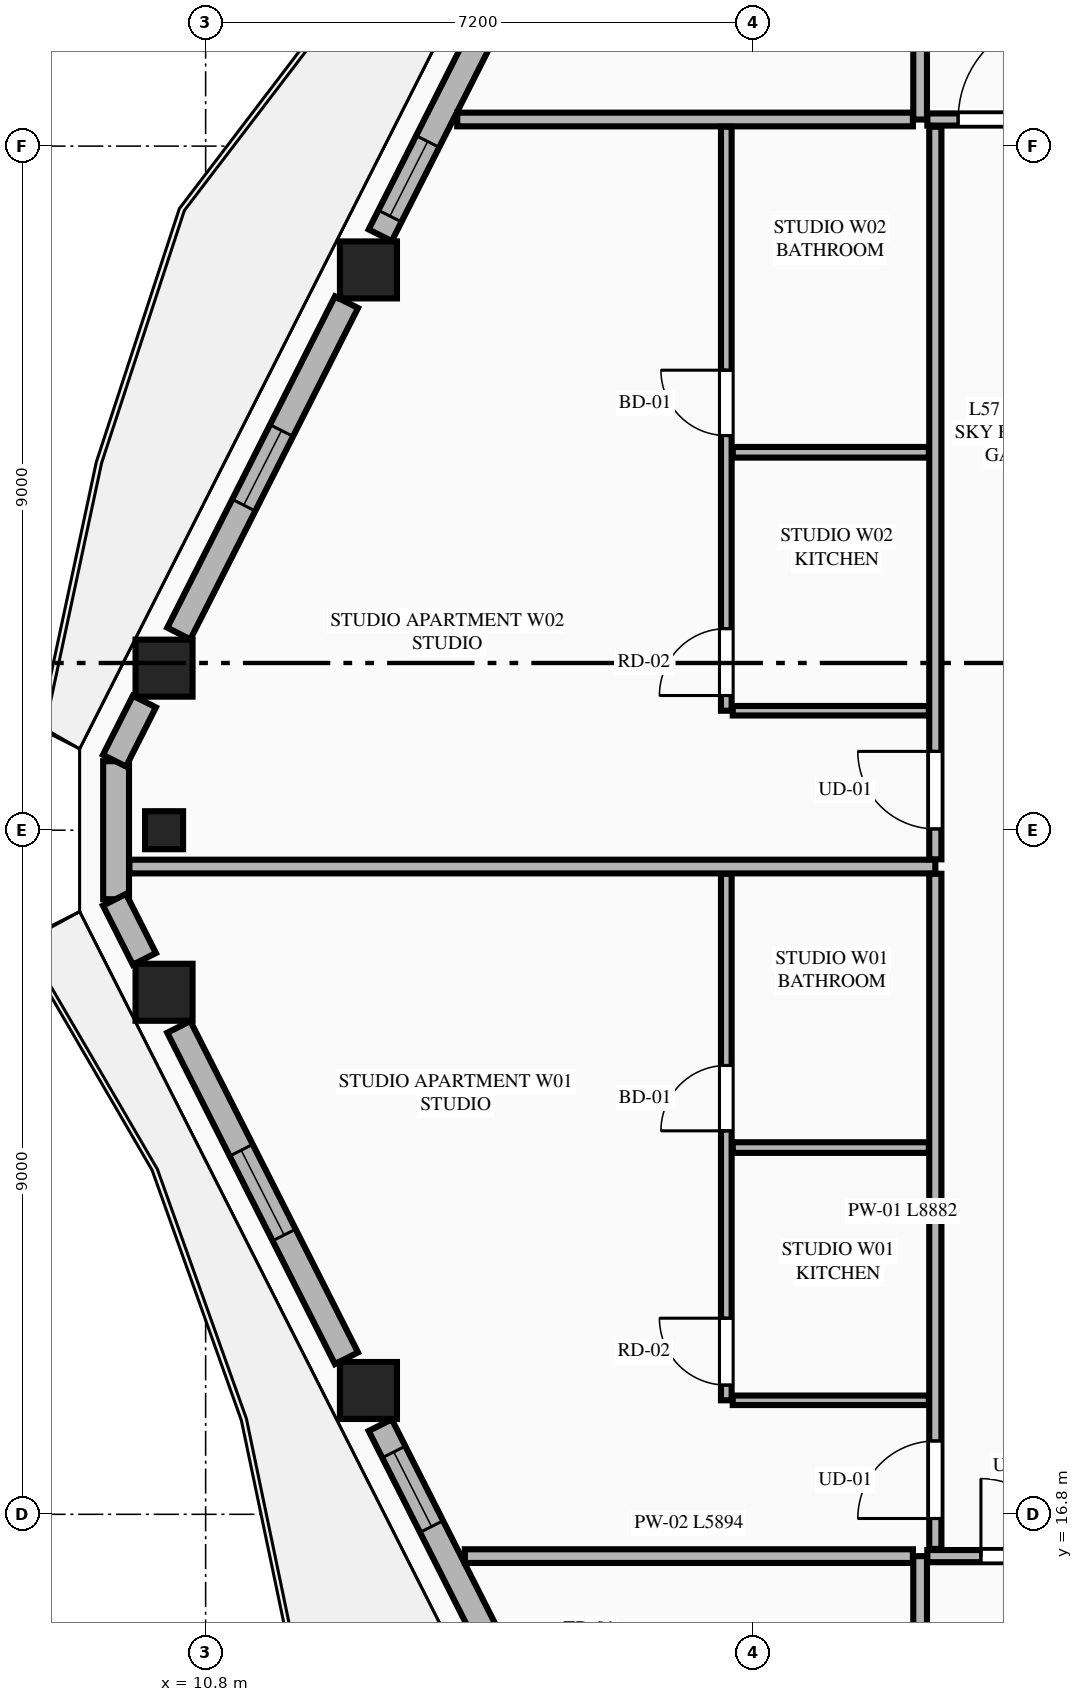
"""IFC4 building model, lengths in metres.
Left out: names, types, materials, properties, quantities, classifications, styles, units other than length and angle.
Written with IfcOpenShell. Run it as: python <this file> out.ifc"""

import sys

from ifc_helpers import new_model, si_unit, direction, frame, frame_2d, origin, origin_2d, place, context, subcontext, project, spatial, rectangle, extrude, element, fill, save


model = new_model("IFC4")
c1 = context("Model", 3, precision=1e-05, world=origin(), true_north=direction((0.0, 1.0)))
c2 = subcontext(c1, "Body", "Model", "MODEL_VIEW")
j1 = project(units=[si_unit("LENGTHUNIT", "METRE"), si_unit("PLANEANGLEUNIT", "RADIAN")], contexts=[c1])
p1 = place(None, origin())
s1 = spatial("IfcSite", under=j1, at=p1, CompositionType="ELEMENT")
p2 = place(p1, origin())
s2 = spatial("IfcBuilding", under=s1, at=p2, CompositionType="ELEMENT")
p3 = place(p2, frame((0.0, 0.0, 214.5)))
s3 = spatial("IfcBuildingStorey", under=s2, at=p3, CompositionType="ELEMENT", Elevation=214.5)
for number, where, z_axis, x_axis in (
    (1, (12.942, 33.171, 0.0), (0.0, 0.0, 1.0), (1.0, 0.0, 0.0)),
    (2, (10.253, 27.932, 0.0), (0.0, 0.0, 1.0), (1.0, 0.0, 0.0)),
    (3, (10.253, 23.668, 0.0), (0.0, 0.0, 1.0), (1.0, 0.0, 0.0)),
    (4, (12.942, 18.429, 0.0), (0.0, 0.0, 1.0), (1.0, 0.0, 0.0)),
):
    element("IfcColumn", number, at=place(p3, frame(where, z_axis=z_axis, x_axis=x_axis)), inside=s3, PredefinedType="COLUMN", context=c2, shape_type="SweptSolid", body=[
        extrude(rectangle(XDim=0.75, YDim=0.75, at=origin_2d()), origin(), (0.0, 0.0, 1.0), 3.55),
    ])
p4 = place(p3, frame((10.253, 25.8, 0.0), z_axis=(0.0, 0.0, 1.0), x_axis=(0.0, -1.0, 0.0)))
e5 = element("IfcColumn", 5, at=p4, inside=s3, PredefinedType="PILASTER", context=c2, shape_type="SweptSolid", body=[
    extrude(rectangle(XDim=0.5, YDim=0.35, at=origin_2d()), origin(), (0.0, 0.0, 1.0), 3.55),
])
p5 = place(p3, frame((9.622, 26.708, 0.0), z_axis=(0.0, 0.0, 1.0), x_axis=(0.0, -1.0, 0.0)))
e6 = element("IfcWall", 6, at=p5, inside=s3, PredefinedType="STANDARD", context=c2, shape_type="SweptSolid", body=[
    extrude(rectangle(XDim=1.816, YDim=0.34, at=frame_2d((0.908, 0.0))), origin(), (0.0, 0.0, 1.0), 3.35),
])
p6 = place(p3, frame((15.397, 38.173, 0.0), z_axis=(0.0, 0.0, 1.0), x_axis=(-0.451444616922, -0.892299141461, 0.0)))
e7 = element("IfcWall", 7, at=p6, inside=s3, PredefinedType="STANDARD", context=c2, shape_type="SweptSolid", body=[
    extrude(rectangle(XDim=5.095, YDim=0.34, at=frame_2d((2.547, 0.0))), origin(), (0.0, 0.0, 1.0), 2.883),
])
p7 = place(p6, frame((1.019, 0.0, 0.0)))
e8 = element("IfcOpeningElement", 8, at=p7, cuts=e7, PredefinedType="OPENING", context=c2, shape_type="SweptSolid", body=[
    extrude(rectangle(XDim=1.1, YDim=2.25, at=frame_2d((0.55, 1.125))), frame((0.0, 0.18, 0.0), z_axis=(0.0, -1.0, 0.0), x_axis=(1.0, 0.0, 0.0)), (0.0, 0.0, 1.0), 0.36),
])
p8 = place(p6, frame((3.712, 0.0, 0.75)))
e9 = element("IfcOpeningElement", 9, at=p8, cuts=e7, PredefinedType="OPENING", context=c2, shape_type="SweptSolid", body=[
    extrude(rectangle(XDim=1.1, YDim=1.983, at=frame_2d((0.55, 0.991))), frame((0.0, 0.18, 0.0), z_axis=(0.0, -1.0, 0.0), x_axis=(1.0, 0.0, 0.0)), (0.0, 0.0, 1.0), 0.36),
])
p9 = place(p3, frame((12.653, 32.747, 0.0), z_axis=(0.0, 0.0, 1.0), x_axis=(-0.451545895749, -0.892247893824, 0.0)))
e10 = element("IfcWall", 10, at=p9, inside=s3, PredefinedType="STANDARD", context=c2, shape_type="SweptSolid", body=[
    extrude(rectangle(XDim=4.885, YDim=0.34, at=frame_2d((2.443, 0.0))), origin(), (0.0, 0.0, 1.0), 2.883),
])
p10 = place(p9, frame((1.893, 0.0, 0.75)))
e11 = element("IfcOpeningElement", 11, at=p10, cuts=e10, PredefinedType="OPENING", context=c2, shape_type="SweptSolid", body=[
    extrude(rectangle(XDim=1.1, YDim=1.983, at=frame_2d((0.55, 0.991))), frame((0.0, 0.18, 0.0), z_axis=(0.0, -1.0, 0.0), x_axis=(1.0, 0.0, 0.0)), (0.0, 0.0, 1.0), 0.36),
])
p11 = place(p3, frame((9.994, 27.493, 0.0), z_axis=(0.0, 0.0, 1.0), x_axis=(-0.450796198004, -0.892626902947, 0.0)))
e12 = element("IfcWall", 12, at=p11, inside=s3, PredefinedType="STANDARD", context=c2, shape_type="SweptSolid", body=[
    extrude(rectangle(XDim=0.871, YDim=0.34, at=frame_2d((0.436, 0.0))), origin(), (0.0, 0.0, 1.0), 3.35),
])
p12 = place(p3, frame((9.601, 24.885, 0.0), z_axis=(0.0, 0.0, 1.0), x_axis=(0.450683483537, -0.892683817299, 0.0)))
e13 = element("IfcWall", 13, at=p12, inside=s3, PredefinedType="STANDARD", context=c2, shape_type="SweptSolid", body=[
    extrude(rectangle(XDim=0.872, YDim=0.34, at=frame_2d((0.436, 0.0))), origin(), (0.0, 0.0, 1.0), 3.35),
])
p13 = place(p3, frame((10.447, 23.212, 0.0), z_axis=(0.0, 0.0, 1.0), x_axis=(0.451566029745, -0.892237704191, 0.0)))
e14 = element("IfcWall", 14, at=p13, inside=s3, PredefinedType="STANDARD", context=c2, shape_type="SweptSolid", body=[
    extrude(rectangle(XDim=4.885, YDim=0.34, at=frame_2d((2.443, 0.0))), origin(), (0.0, 0.0, 1.0), 2.883),
])
p14 = place(p13, frame((1.818, 0.0, 0.75)))
e15 = element("IfcOpeningElement", 15, at=p14, cuts=e14, PredefinedType="OPENING", context=c2, shape_type="SweptSolid", body=[
    extrude(rectangle(XDim=1.25, YDim=1.95, at=frame_2d((0.625, 0.975))), frame((0.0, 0.18, 0.0), z_axis=(0.0, -1.0, 0.0), x_axis=(1.0, 0.0, 0.0)), (0.0, 0.0, 1.0), 0.36),
])
p15 = place(p3, frame((13.097, 17.973, 0.0), z_axis=(0.0, 0.0, 1.0), x_axis=(0.451463920536, -0.892289374841, 0.0)))
e16 = element("IfcWall", 16, at=p15, inside=s3, PredefinedType="STANDARD", context=c2, shape_type="SweptSolid", body=[
    extrude(rectangle(XDim=5.095, YDim=0.34, at=frame_2d((2.547, 0.0))), origin(), (0.0, 0.0, 1.0), 2.883),
])
p16 = place(p15, frame((3.088, 0.0, 0.0)))
e17 = element("IfcOpeningElement", 17, at=p16, cuts=e16, PredefinedType="OPENING", context=c2, shape_type="SweptSolid", body=[
    extrude(rectangle(XDim=1.1, YDim=2.25, at=frame_2d((0.55, 1.125))), frame((0.0, 0.18, 0.0), z_axis=(0.0, -1.0, 0.0), x_axis=(1.0, 0.0, 0.0)), (0.0, 0.0, 1.0), 0.36),
])
p17 = place(p15, frame((0.395, 0.0, 0.75)))
e18 = element("IfcOpeningElement", 18, at=p17, cuts=e16, PredefinedType="OPENING", context=c2, shape_type="SweptSolid", body=[
    extrude(rectangle(XDim=1.1, YDim=1.983, at=frame_2d((0.55, 0.991))), frame((0.0, 0.18, 0.0), z_axis=(0.0, -1.0, 0.0), x_axis=(1.0, 0.0, 0.0)), (0.0, 0.0, 1.0), 0.36),
])
p18 = place(p3, frame((20.2, 5.968, 0.0), z_axis=(0.0, 0.0, 1.0), x_axis=(0.0, 1.0, 0.0)))
e19 = element("IfcWall", 19, at=p18, inside=s3, PredefinedType="PARTITIONING", context=c2, shape_type="SweptSolid", body=[
    extrude(rectangle(XDim=10.282, YDim=0.18, at=frame_2d((5.141, 0.0))), origin(), (0.0, 0.0, 1.0), 3.35),
])
p19 = place(p3, frame((20.295, 16.25, 0.0), z_axis=(0.0, 0.0, 1.0), x_axis=(1.0, 0.0, 0.0)))
e20 = element("IfcWall", 20, at=p19, inside=s3, PredefinedType="PARTITIONING", context=c2, shape_type="SweptSolid", body=[
    extrude(rectangle(XDim=24.21, YDim=0.16, at=frame_2d((12.105, 0.0))), origin(), (0.0, 0.0, 1.0), 3.35),
])
p20 = place(p19, frame((0.705, 0.0, 0.0)))
e21 = element("IfcOpeningElement", 21, at=p20, cuts=e20, PredefinedType="OPENING", context=c2, shape_type="SweptSolid", body=[
    extrude(rectangle(XDim=1.02, YDim=2.25, at=frame_2d((0.51, 1.125))), frame((0.0, 0.09, 0.0), z_axis=(0.0, -1.0, 0.0), x_axis=(1.0, 0.0, 0.0)), (0.0, 0.0, 1.0), 0.18),
])
p21 = place(p3, frame((20.2, 35.15, 0.0), z_axis=(0.0, 0.0, 1.0), x_axis=(0.0, 1.0, 0.0)))
e22 = element("IfcWall", 22, at=p21, inside=s3, PredefinedType="PARTITIONING", context=c2, shape_type="SweptSolid", body=[
    extrude(rectangle(XDim=10.482, YDim=0.18, at=frame_2d((5.241, 0.0))), origin(), (0.0, 0.0, 1.0), 3.35),
])
p22 = place(p3, frame((20.295, 35.15, 0.0), z_axis=(0.0, 0.0, 1.0), x_axis=(1.0, 0.0, 0.0)))
e23 = element("IfcWall", 23, at=p22, inside=s3, PredefinedType="PARTITIONING", context=c2, shape_type="SweptSolid", body=[
    extrude(rectangle(XDim=24.21, YDim=0.16, at=frame_2d((12.105, 0.0))), origin(), (0.0, 0.0, 1.0), 3.35),
])
p23 = place(p22, frame((0.405, 0.0, 0.0)))
e24 = element("IfcOpeningElement", 24, at=p23, cuts=e23, PredefinedType="OPENING", context=c2, shape_type="SweptSolid", body=[
    extrude(rectangle(XDim=1.35, YDim=2.35, at=frame_2d((0.675, 1.175))), frame((0.0, 0.09, 0.0), z_axis=(0.0, -1.0, 0.0), x_axis=(1.0, 0.0, 0.0)), (0.0, 0.0, 1.0), 0.18),
])
p24 = place(p3, frame((14.211, 16.25, 0.0), z_axis=(0.0, 0.0, 1.0), x_axis=(1.0, 0.0, 0.0)))
e25 = element("IfcWall", 25, at=p24, inside=s3, PredefinedType="PARTITIONING", context=c2, shape_type="SweptSolid", body=[
    extrude(rectangle(XDim=5.894, YDim=0.18, at=frame_2d((2.947, 0.0))), origin(), (0.0, 0.0, 1.0), 3.35),
])
p25 = place(p3, frame((14.11, 35.15, 0.0), z_axis=(0.0, 0.0, 1.0), x_axis=(1.0, 0.0, 0.0)))
e26 = element("IfcWall", 26, at=p25, inside=s3, PredefinedType="PARTITIONING", context=c2, shape_type="SweptSolid", body=[
    extrude(rectangle(XDim=5.995, YDim=0.18, at=frame_2d((2.998, 0.0))), origin(), (0.0, 0.0, 1.0), 3.35),
])
p26 = place(p3, frame((20.4, 16.345, 0.0), z_axis=(0.0, 0.0, 1.0), x_axis=(0.0, 1.0, 0.0)))
e27 = element("IfcWall", 27, at=p26, inside=s3, PredefinedType="PARTITIONING", context=c2, shape_type="SweptSolid", body=[
    extrude(rectangle(XDim=8.882, YDim=0.16, at=frame_2d((4.441, 0.0))), origin(), (0.0, 0.0, 1.0), 3.35),
])
p27 = place(p26, frame((0.4, 0.0, 0.0)))
e28 = element("IfcOpeningElement", 28, at=p27, cuts=e27, PredefinedType="OPENING", context=c2, shape_type="SweptSolid", body=[
    extrude(rectangle(XDim=1.02, YDim=2.25, at=frame_2d((0.51, 1.125))), frame((0.0, 0.09, 0.0), z_axis=(0.0, -1.0, 0.0), x_axis=(1.0, 0.0, 0.0)), (0.0, 0.0, 1.0), 0.18),
])
p28 = place(p3, frame((17.735, 18.3, 0.0), z_axis=(0.0, 0.0, 1.0), x_axis=(1.0, 0.0, 0.0)))
e29 = element("IfcWall", 29, at=p28, inside=s3, PredefinedType="PARTITIONING", context=c2, shape_type="SweptSolid", body=[
    extrude(rectangle(XDim=2.58, YDim=0.125, at=frame_2d((1.29, 0.0))), origin(), (0.0, 0.0, 1.0), 2.807),
])
p29 = place(p3, frame((17.65, 18.3, 0.0), z_axis=(0.0, 0.0, 1.0), x_axis=(0.0, 1.0, 0.0)))
e30 = element("IfcWall", 30, at=p29, inside=s3, PredefinedType="PLUMBINGWALL", context=c2, shape_type="SweptSolid", body=[
    extrude(rectangle(XDim=6.927, YDim=0.14, at=frame_2d((3.463, 0.0))), origin(), (0.0, 0.0, 1.0), 3.35),
])
p30 = place(p29, frame((3.545, 0.0, 0.0)))
e31 = element("IfcOpeningElement", 31, at=p30, cuts=e30, PredefinedType="OPENING", context=c2, shape_type="SweptSolid", body=[
    extrude(rectangle(XDim=0.86, YDim=2.1, at=frame_2d((0.43, 1.05))), frame((0.0, 0.08, 0.0), z_axis=(0.0, -1.0, 0.0), x_axis=(1.0, 0.0, 0.0)), (0.0, 0.0, 1.0), 0.16),
])
p31 = place(p29, frame((0.2, 0.0, 0.0)))
e32 = element("IfcOpeningElement", 32, at=p31, cuts=e30, PredefinedType="OPENING", context=c2, shape_type="SweptSolid", body=[
    extrude(rectangle(XDim=0.88, YDim=2.15, at=frame_2d((0.44, 1.075))), frame((0.0, 0.08, 0.0), z_axis=(0.0, -1.0, 0.0), x_axis=(1.0, 0.0, 0.0)), (0.0, 0.0, 1.0), 0.16),
])
p32 = place(p3, frame((17.735, 21.625, 0.0), z_axis=(0.0, 0.0, 1.0), x_axis=(1.0, 0.0, 0.0)))
e33 = element("IfcWall", 33, at=p32, inside=s3, PredefinedType="PLUMBINGWALL", context=c2, shape_type="SweptSolid", body=[
    extrude(rectangle(XDim=2.58, YDim=0.14, at=frame_2d((1.29, 0.0))), origin(), (0.0, 0.0, 1.0), 3.35),
])
p33 = place(p3, frame((9.797, 25.322, 0.0), z_axis=(0.0, 0.0, 1.0), x_axis=(1.0, 0.0, 0.0)))
e34 = element("IfcWall", 34, at=p33, inside=s3, PredefinedType="PARTITIONING", context=c2, shape_type="SweptSolid", body=[
    extrude(rectangle(XDim=10.603, YDim=0.18, at=frame_2d((5.301, 0.0))), origin(), (0.0, 0.0, 1.0), 3.35),
])
p34 = place(p3, frame((20.4, 25.417, 0.0), z_axis=(0.0, 0.0, 1.0), x_axis=(0.0, 1.0, 0.0)))
e35 = element("IfcWall", 35, at=p34, inside=s3, PredefinedType="PARTITIONING", context=c2, shape_type="SweptSolid", body=[
    extrude(rectangle(XDim=9.638, YDim=0.16, at=frame_2d((4.819, 0.0))), origin(), (0.0, 0.0, 1.0), 3.35),
])
p35 = place(p34, frame((0.4, 0.0, 0.0)))
e36 = element("IfcOpeningElement", 36, at=p35, cuts=e35, PredefinedType="OPENING", context=c2, shape_type="SweptSolid", body=[
    extrude(rectangle(XDim=1.02, YDim=2.25, at=frame_2d((0.51, 1.125))), frame((0.0, 0.09, 0.0), z_axis=(0.0, -1.0, 0.0), x_axis=(1.0, 0.0, 0.0)), (0.0, 0.0, 1.0), 0.18),
])
p36 = place(p3, frame((17.735, 27.372, 0.0), z_axis=(0.0, 0.0, 1.0), x_axis=(1.0, 0.0, 0.0)))
e37 = element("IfcWall", 37, at=p36, inside=s3, PredefinedType="PARTITIONING", context=c2, shape_type="SweptSolid", body=[
    extrude(rectangle(XDim=2.58, YDim=0.125, at=frame_2d((1.29, 0.0))), origin(), (0.0, 0.0, 1.0), 3.35),
])
p37 = place(p3, frame((17.65, 27.372, 0.0), z_axis=(0.0, 0.0, 1.0), x_axis=(0.0, 1.0, 0.0)))
e38 = element("IfcWall", 38, at=p37, inside=s3, PredefinedType="PLUMBINGWALL", context=c2, shape_type="SweptSolid", body=[
    extrude(rectangle(XDim=7.683, YDim=0.14, at=frame_2d((3.841, 0.0))), origin(), (0.0, 0.0, 1.0), 3.35),
])
p38 = place(p37, frame((3.62, 0.0, 0.0)))
e39 = element("IfcOpeningElement", 39, at=p38, cuts=e38, PredefinedType="OPENING", context=c2, shape_type="SweptSolid", body=[
    extrude(rectangle(XDim=0.86, YDim=2.1, at=frame_2d((0.43, 1.05))), frame((0.0, 0.08, 0.0), z_axis=(0.0, -1.0, 0.0), x_axis=(1.0, 0.0, 0.0)), (0.0, 0.0, 1.0), 0.16),
])
p39 = place(p37, frame((0.2, 0.0, 0.0)))
e40 = element("IfcOpeningElement", 40, at=p39, cuts=e38, PredefinedType="OPENING", context=c2, shape_type="SweptSolid", body=[
    extrude(rectangle(XDim=0.88, YDim=2.15, at=frame_2d((0.44, 1.075))), frame((0.0, 0.08, 0.0), z_axis=(0.0, -1.0, 0.0), x_axis=(1.0, 0.0, 0.0)), (0.0, 0.0, 1.0), 0.16),
])
p40 = place(p3, frame((17.735, 30.772, 0.0), z_axis=(0.0, 0.0, 1.0), x_axis=(1.0, 0.0, 0.0)))
e41 = element("IfcWall", 41, at=p40, inside=s3, PredefinedType="PLUMBINGWALL", context=c2, shape_type="SweptSolid", body=[
    extrude(rectangle(XDim=2.58, YDim=0.14, at=frame_2d((1.29, 0.0))), origin(), (0.0, 0.0, 1.0), 3.35),
])
p41 = place(p10, origin())
e42 = element("IfcWindow", 42, at=p41, inside=s3, PartitioningType="SINGLE_PANEL", PredefinedType="WINDOW", context=c2, shape_type="SweptSolid", body=[
    extrude(rectangle(XDim=1.1, YDim=1.983, at=frame_2d((0.55, 0.991))), frame((0.0, 0.03, 0.0), z_axis=(0.0, -1.0, 0.0), x_axis=(1.0, 0.0, 0.0)), (0.0, 0.0, 1.0), 0.06),
])
fill(e11, e42)
p42 = place(p14, origin())
e43 = element("IfcWindow", 43, at=p42, inside=s3, PartitioningType="SINGLE_PANEL", PredefinedType="WINDOW", context=c2, shape_type="SweptSolid", body=[
    extrude(rectangle(XDim=1.25, YDim=1.95, at=frame_2d((0.625, 0.975))), frame((0.0, 0.03, 0.0), z_axis=(0.0, -1.0, 0.0), x_axis=(1.0, 0.0, 0.0)), (0.0, 0.0, 1.0), 0.06),
])
fill(e15, e43)
p43 = place(p20, origin())
e44 = element("IfcDoor", 44, at=p43, inside=s3, OperationType="SINGLE_SWING_LEFT", PredefinedType="DOOR", context=c2, shape_type="SweptSolid", body=[
    extrude(rectangle(XDim=1.02, YDim=2.25, at=frame_2d((0.51, 1.125))), frame((0.0, 0.025, 0.0), z_axis=(0.0, -1.0, 0.0), x_axis=(1.0, 0.0, 0.0)), (0.0, 0.0, 1.0), 0.05),
])
fill(e21, e44)
p44 = place(p23, origin())
e45 = element("IfcDoor", 45, at=p44, inside=s3, OperationType="SINGLE_SWING_RIGHT", PredefinedType="DOOR", context=c2, shape_type="SweptSolid", body=[
    extrude(rectangle(XDim=1.35, YDim=2.35, at=frame_2d((0.675, 1.175))), frame((0.0, 0.025, 0.0), z_axis=(0.0, -1.0, 0.0), x_axis=(1.0, 0.0, 0.0)), (0.0, 0.0, 1.0), 0.05),
])
fill(e24, e45)
p45 = place(p30, origin())
e46 = element("IfcDoor", 46, at=p45, inside=s3, OperationType="SINGLE_SWING_LEFT", PredefinedType="DOOR", context=c2, shape_type="SweptSolid", body=[
    extrude(rectangle(XDim=0.86, YDim=2.1, at=frame_2d((0.43, 1.05))), frame((0.0, 0.025, 0.0), z_axis=(0.0, -1.0, 0.0), x_axis=(1.0, 0.0, 0.0)), (0.0, 0.0, 1.0), 0.05),
])
fill(e31, e46)
p46 = place(p27, origin())
e47 = element("IfcDoor", 47, at=p46, inside=s3, OperationType="SINGLE_SWING_LEFT", PredefinedType="DOOR", context=c2, shape_type="SweptSolid", body=[
    extrude(rectangle(XDim=1.02, YDim=2.25, at=frame_2d((0.51, 1.125))), frame((0.0, 0.025, 0.0), z_axis=(0.0, -1.0, 0.0), x_axis=(1.0, 0.0, 0.0)), (0.0, 0.0, 1.0), 0.05),
])
fill(e28, e47)
p47 = place(p31, origin())
e48 = element("IfcDoor", 48, at=p47, inside=s3, OperationType="SINGLE_SWING_RIGHT", PredefinedType="DOOR", context=c2, shape_type="SweptSolid", body=[
    extrude(rectangle(XDim=0.88, YDim=2.15, at=frame_2d((0.44, 1.075))), frame((0.0, 0.025, 0.0), z_axis=(0.0, -1.0, 0.0), x_axis=(1.0, 0.0, 0.0)), (0.0, 0.0, 1.0), 0.05),
])
fill(e32, e48)
p48 = place(p38, origin())
e49 = element("IfcDoor", 49, at=p48, inside=s3, OperationType="SINGLE_SWING_RIGHT", PredefinedType="DOOR", context=c2, shape_type="SweptSolid", body=[
    extrude(rectangle(XDim=0.86, YDim=2.1, at=frame_2d((0.43, 1.05))), frame((0.0, 0.025, 0.0), z_axis=(0.0, -1.0, 0.0), x_axis=(1.0, 0.0, 0.0)), (0.0, 0.0, 1.0), 0.05),
])
fill(e39, e49)
p49 = place(p35, origin())
e50 = element("IfcDoor", 50, at=p49, inside=s3, OperationType="SINGLE_SWING_RIGHT", PredefinedType="DOOR", context=c2, shape_type="SweptSolid", body=[
    extrude(rectangle(XDim=1.02, YDim=2.25, at=frame_2d((0.51, 1.125))), frame((0.0, 0.025, 0.0), z_axis=(0.0, -1.0, 0.0), x_axis=(1.0, 0.0, 0.0)), (0.0, 0.0, 1.0), 0.05),
])
fill(e36, e50)
p50 = place(p39, origin())
e51 = element("IfcDoor", 51, at=p50, inside=s3, OperationType="SINGLE_SWING_LEFT", PredefinedType="DOOR", context=c2, shape_type="SweptSolid", body=[
    extrude(rectangle(XDim=0.88, YDim=2.15, at=frame_2d((0.44, 1.075))), frame((0.0, 0.025, 0.0), z_axis=(0.0, -1.0, 0.0), x_axis=(1.0, 0.0, 0.0)), (0.0, 0.0, 1.0), 0.05),
])
fill(e40, e51)
p51 = place(p8, origin())
e52 = element("IfcWindow", 52, at=p51, inside=s3, PartitioningType="SINGLE_PANEL", PredefinedType="WINDOW", context=c2, shape_type="SweptSolid", body=[
    extrude(rectangle(XDim=1.1, YDim=1.983, at=frame_2d((0.55, 0.991))), frame((0.0, 0.03, 0.0), z_axis=(0.0, -1.0, 0.0), x_axis=(1.0, 0.0, 0.0)), (0.0, 0.0, 1.0), 0.06),
])
fill(e9, e52)
p52 = place(p17, origin())
e53 = element("IfcWindow", 53, at=p52, inside=s3, PartitioningType="SINGLE_PANEL", PredefinedType="WINDOW", context=c2, shape_type="SweptSolid", body=[
    extrude(rectangle(XDim=1.1, YDim=1.983, at=frame_2d((0.55, 0.991))), frame((0.0, 0.03, 0.0), z_axis=(0.0, -1.0, 0.0), x_axis=(1.0, 0.0, 0.0)), (0.0, 0.0, 1.0), 0.06),
])
fill(e18, e53)
save(model, sys.argv[1])
